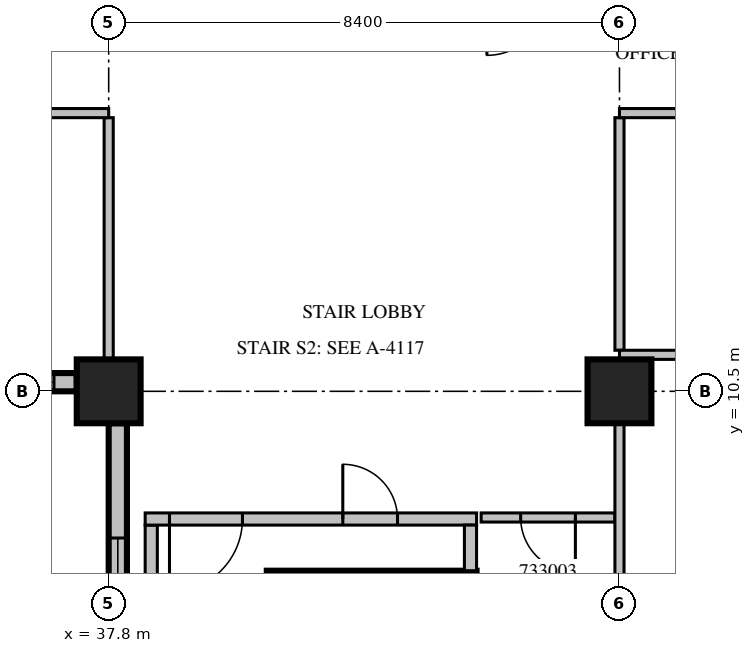
"""IFC4 building model, lengths in metres.
Left out: names, types, materials, properties, quantities, classifications, styles, units other than length and angle.
Written with IfcOpenShell. Run it as: python <this file> out.ifc"""

import sys

from ifc_helpers import new_model, si_unit, direction, frame, frame_2d, origin, origin_2d, place, context, subcontext, project, spatial, rectangle, extrude, source, transform, mapped, element, fill, save


model = new_model("IFC4")
c1 = context("Model", 3, precision=1e-05, world=origin(), true_north=direction((0.0, 1.0)))
c2 = subcontext(c1, "Body", "Model", "MODEL_VIEW")
j1 = project(units=[si_unit("LENGTHUNIT", "METRE"), si_unit("PLANEANGLEUNIT", "RADIAN")], contexts=[c1])
p1 = place(None, origin())
s1 = spatial("IfcSite", under=j1, at=p1, CompositionType="ELEMENT")
p2 = place(p1, origin())
s2 = spatial("IfcBuilding", under=s1, at=p2, CompositionType="ELEMENT")
p3 = place(p2, frame((0.0, 0.0, 149.7)))
s3 = spatial("IfcBuildingStorey", under=s2, at=p3, CompositionType="ELEMENT", Elevation=149.7)
m1 = source(origin(), c2, "Body", "SweptSolid", [
    extrude(rectangle(XDim=1.05, YDim=1.05, at=origin_2d()), origin(), (0.0, 0.0, 1.0), 4.2),
])
for number, where, z_axis, x_axis in (
    (1, (37.8, 10.5, 0.0), (0.0, 0.0, 1.0), (1.0, 0.0, 0.0)),
    (2, (46.2, 10.5, 0.0), (0.0, 0.0, 1.0), (1.0, 0.0, 0.0)),
):
    element("IfcColumn", number, at=place(p3, frame(where, z_axis=z_axis, x_axis=x_axis)), inside=s3, PredefinedType="COLUMN", context=c2, shape_type="MappedRepresentation", body=[
        mapped(m1, transform((0.0, 0.0, 0.0), scale=1.0)),
    ])
m2 = source(origin(), c2, "Body", "SweptSolid", [
    extrude(rectangle(XDim=7.35, YDim=0.3, at=frame_2d((3.675, 0.0))), origin(), (0.0, 0.0, 1.0), 3.8),
])
p4 = place(p3, frame((29.925, 10.65, 0.0), z_axis=(0.0, 0.0, 1.0), x_axis=(1.0, 0.0, 0.0)))
e3 = element("IfcWall", 3, at=p4, inside=s3, PredefinedType="STANDARD", context=c2, shape_type="MappedRepresentation", body=[
    mapped(m2, transform((0.0, 0.0, 0.0), scale=1.0)),
])
m3 = source(origin(), c2, "Body", "SweptSolid", [
    extrude(rectangle(XDim=2.4, YDim=2.7, at=frame_2d((1.2, 1.35))), frame((0.0, 0.16, 0.0), z_axis=(0.0, -1.0, 0.0), x_axis=(1.0, 0.0, 0.0)), (0.0, 0.0, 1.0), 0.32),
])
p5 = place(p4, frame((0.375, 0.0, 0.6)))
e4 = element("IfcOpeningElement", 4, at=p5, cuts=e3, PredefinedType="OPENING", context=c2, shape_type="MappedRepresentation", body=[
    mapped(m3, transform((0.0, 0.0, 0.0), scale=1.0)),
])
p6 = place(p4, frame((4.575, 0.0, 0.6)))
e5 = element("IfcOpeningElement", 5, at=p6, cuts=e3, PredefinedType="OPENING", context=c2, shape_type="MappedRepresentation", body=[
    mapped(m3, transform((0.0, 0.0, 0.0), scale=1.0)),
])
m4 = source(origin(), c2, "Body", "SweptSolid", [
    extrude(rectangle(XDim=8.925, YDim=0.3, at=frame_2d((4.463, 0.0))), origin(), (0.0, 0.0, 1.0), 3.8),
])
p7 = place(p3, frame((37.95, 9.975, 0.0), z_axis=(0.0, 0.0, 1.0), x_axis=(0.0, -1.0, 0.0)))
e6 = element("IfcWall", 6, at=p7, inside=s3, PredefinedType="STANDARD", context=c2, shape_type="MappedRepresentation", body=[
    mapped(m4, transform((0.0, 0.0, 0.0), scale=1.0)),
])
m5 = source(origin(), c2, "Body", "SweptSolid", [
    extrude(rectangle(XDim=1.8, YDim=2.7, at=frame_2d((0.9, 1.35))), frame((0.0, 0.16, 0.0), z_axis=(0.0, -1.0, 0.0), x_axis=(1.0, 0.0, 0.0)), (0.0, 0.0, 1.0), 0.32),
])
p8 = place(p7, frame((1.887, 0.0, 0.6)))
e7 = element("IfcOpeningElement", 7, at=p8, cuts=e6, PredefinedType="OPENING", context=c2, shape_type="MappedRepresentation", body=[
    mapped(m5, transform((0.0, 0.0, 0.0), scale=1.0)),
])
p9 = place(p7, frame((6.15, 0.0, 0.6)))
e8 = element("IfcOpeningElement", 8, at=p9, cuts=e6, PredefinedType="OPENING", context=c2, shape_type="MappedRepresentation", body=[
    mapped(m3, transform((0.0, 0.0, 0.0), scale=1.0)),
])
m6 = source(origin(), c2, "Body", "SweptSolid", [
    extrude(rectangle(XDim=3.45, YDim=0.25, at=frame_2d((1.725, 0.0))), origin(), (0.0, 0.0, 1.0), 3.8),
])
p10 = place(p3, frame((40.4, 7.425, 0.0), z_axis=(0.0, 0.0, 1.0), x_axis=(1.0, 0.0, 0.0)))
e9 = element("IfcWall", 9, at=p10, inside=s3, PredefinedType="SOLIDWALL", context=c2, shape_type="MappedRepresentation", body=[
    mapped(m6, transform((0.0, 0.0, 0.0), scale=1.0)),
])
m7 = source(origin(), c2, "Body", "SweptSolid", [
    extrude(rectangle(XDim=8.0, YDim=0.2, at=frame_2d((4.0, 0.0))), origin(), (0.0, 0.0, 1.0), 3.8),
])
p11 = place(p3, frame((38.5, 0.3, 0.0), z_axis=(0.0, 0.0, 1.0), x_axis=(0.0, 1.0, 0.0)))
e10 = element("IfcWall", 10, at=p11, inside=s3, PredefinedType="PARTITIONING", context=c2, shape_type="MappedRepresentation", body=[
    mapped(m7, transform((0.0, 0.0, 0.0), scale=1.0)),
])
m8 = source(origin(), c2, "Body", "SweptSolid", [
    extrude(rectangle(XDim=5.45, YDim=0.2, at=frame_2d((2.725, 0.0))), origin(), (0.0, 0.0, 1.0), 3.8),
])
p12 = place(p3, frame((38.4, 8.4, 0.0), z_axis=(0.0, 0.0, 1.0), x_axis=(1.0, 0.0, 0.0)))
e11 = element("IfcWall", 11, at=p12, inside=s3, PredefinedType="PARTITIONING", context=c2, shape_type="MappedRepresentation", body=[
    mapped(m8, transform((0.0, 0.0, 0.0), scale=1.0)),
])
m9 = source(origin(), c2, "Body", "SweptSolid", [
    extrude(rectangle(XDim=1.2, YDim=2.1, at=frame_2d((0.6, 1.05))), frame((0.0, 0.11, 0.0), z_axis=(0.0, -1.0, 0.0), x_axis=(1.0, 0.0, 0.0)), (0.0, 0.0, 1.0), 0.22),
])
p13 = place(p12, frame((0.4, 0.0, 0.0)))
e12 = element("IfcOpeningElement", 12, at=p13, cuts=e11, PredefinedType="OPENING", context=c2, shape_type="MappedRepresentation", body=[
    mapped(m9, transform((0.0, 0.0, 0.0), scale=1.0)),
])
m10 = source(origin(), c2, "Body", "SweptSolid", [
    extrude(rectangle(XDim=0.9, YDim=2.1, at=frame_2d((0.45, 1.05))), frame((0.0, 0.11, 0.0), z_axis=(0.0, -1.0, 0.0), x_axis=(1.0, 0.0, 0.0)), (0.0, 0.0, 1.0), 0.22),
])
p14 = place(p12, frame((3.25, 0.0, 0.0)))
e13 = element("IfcOpeningElement", 13, at=p14, cuts=e11, PredefinedType="OPENING", context=c2, shape_type="MappedRepresentation", body=[
    mapped(m10, transform((0.0, 0.0, 0.0), scale=1.0)),
])
m11 = source(origin(), c2, "Body", "SweptSolid", [
    extrude(rectangle(XDim=0.75, YDim=0.2, at=frame_2d((0.375, 0.0))), origin(), (0.0, 0.0, 1.0), 3.8),
])
p15 = place(p3, frame((43.75, 7.55, 0.0), z_axis=(0.0, 0.0, 1.0), x_axis=(0.0, 1.0, 0.0)))
e14 = element("IfcWall", 14, at=p15, inside=s3, PredefinedType="PARTITIONING", context=c2, shape_type="MappedRepresentation", body=[
    mapped(m11, transform((0.0, 0.0, 0.0), scale=1.0)),
])
m12 = source(origin(), c2, "Body", "SweptSolid", [
    extrude(rectangle(XDim=2.2, YDim=0.15, at=frame_2d((1.1, 0.0))), origin(), (0.0, 0.0, 1.0), 3.8),
])
p16 = place(p3, frame((46.125, 8.425, 0.0), z_axis=(0.0, 0.0, 1.0), x_axis=(-1.0, 0.0, 0.0)))
e15 = element("IfcWall", 15, at=p16, inside=s3, PredefinedType="PARTITIONING", context=c2, shape_type="MappedRepresentation", body=[
    mapped(m12, transform((0.0, 0.0, 0.0), scale=1.0)),
])
m13 = source(origin(), c2, "Body", "SweptSolid", [
    extrude(rectangle(XDim=0.9, YDim=2.1, at=frame_2d((0.45, 1.05))), frame((0.0, 0.085, 0.0), z_axis=(0.0, -1.0, 0.0), x_axis=(1.0, 0.0, 0.0)), (0.0, 0.0, 1.0), 0.17),
])
p17 = place(p16, frame((0.65, 0.0, 0.0)))
e16 = element("IfcOpeningElement", 16, at=p17, cuts=e15, PredefinedType="OPENING", context=c2, shape_type="MappedRepresentation", body=[
    mapped(m13, transform((0.0, 0.0, 0.0), scale=1.0)),
])
m14 = source(origin(), c2, "Body", "SweptSolid", [
    extrude(rectangle(XDim=3.976, YDim=0.15, at=frame_2d((1.988, 0.0))), origin(), (0.0, 0.0, 1.0), 3.8),
])
p18 = place(p3, frame((37.8, 11.024, 0.0), z_axis=(0.0, 0.0, 1.0), x_axis=(0.0, 1.0, 0.0)))
e17 = element("IfcWall", 17, at=p18, inside=s3, PredefinedType="PARTITIONING", context=c2, shape_type="MappedRepresentation", body=[
    mapped(m14, transform((0.0, 0.0, 0.0), scale=1.0)),
])
m15 = source(origin(), c2, "Body", "SweptSolid", [
    extrude(rectangle(XDim=8.927, YDim=0.15, at=frame_2d((4.463, 0.0))), origin(), (0.0, 0.0, 1.0), 3.8),
])
p19 = place(p3, frame((46.2, 1.049, 0.0), z_axis=(0.0, 0.0, 1.0), x_axis=(0.0, 1.0, 0.0)))
e18 = element("IfcWall", 18, at=p19, inside=s3, PredefinedType="PARTITIONING", context=c2, shape_type="MappedRepresentation", body=[
    mapped(m15, transform((0.0, 0.0, 0.0), scale=1.0)),
])
m16 = source(origin(), c2, "Body", "SweptSolid", [
    extrude(rectangle(XDim=3.825, YDim=0.15, at=frame_2d((1.913, 0.0))), origin(), (0.0, 0.0, 1.0), 3.8),
])
p20 = place(p3, frame((46.2, 11.175, 0.0), z_axis=(0.0, 0.0, 1.0), x_axis=(0.0, 1.0, 0.0)))
e19 = element("IfcWall", 19, at=p20, inside=s3, PredefinedType="PARTITIONING", context=c2, shape_type="MappedRepresentation", body=[
    mapped(m16, transform((0.0, 0.0, 0.0), scale=1.0)),
])
m17 = source(origin(), c2, "Body", "SweptSolid", [
    extrude(rectangle(XDim=24.9, YDim=0.15, at=frame_2d((12.45, 0.0))), origin(), (0.0, 0.0, 1.0), 3.8),
])
p21 = place(p3, frame((71.1, 11.1, 0.0), z_axis=(0.0, 0.0, 1.0), x_axis=(-1.0, 0.0, 0.0)))
e20 = element("IfcWall", 20, at=p21, inside=s3, PredefinedType="PARTITIONING", context=c2, shape_type="MappedRepresentation", body=[
    mapped(m17, transform((0.0, 0.0, 0.0), scale=1.0)),
])
m18 = source(origin(), c2, "Body", "SweptSolid", [
    extrude(rectangle(XDim=1.1, YDim=2.1, at=frame_2d((0.55, 1.05))), frame((0.0, 0.085, 0.0), z_axis=(0.0, -1.0, 0.0), x_axis=(1.0, 0.0, 0.0)), (0.0, 0.0, 1.0), 0.17),
])
p22 = place(p21, frame((19.988, 0.0, 0.0)))
e21 = element("IfcOpeningElement", 21, at=p22, cuts=e20, PredefinedType="OPENING", context=c2, shape_type="MappedRepresentation", body=[
    mapped(m18, transform((0.0, 0.0, 0.0), scale=1.0)),
])
p23 = place(p21, frame((15.63, 0.0, 0.0)))
e22 = element("IfcOpeningElement", 22, at=p23, cuts=e20, PredefinedType="OPENING", context=c2, shape_type="MappedRepresentation", body=[
    mapped(m13, transform((0.0, 0.0, 0.0), scale=1.0)),
])
p24 = place(p21, frame((9.75, 0.0, 0.0)))
e23 = element("IfcOpeningElement", 23, at=p24, cuts=e20, PredefinedType="OPENING", context=c2, shape_type="MappedRepresentation", body=[
    mapped(m13, transform((0.0, 0.0, 0.0), scale=1.0)),
])
p25 = place(p21, frame((2.205, 0.0, 0.0)))
e24 = element("IfcOpeningElement", 24, at=p25, cuts=e20, PredefinedType="OPENING", context=c2, shape_type="MappedRepresentation", body=[
    mapped(m13, transform((0.0, 0.0, 0.0), scale=1.0)),
])
m19 = source(origin(), c2, "Body", "SweptSolid", [
    extrude(rectangle(XDim=8.4, YDim=0.15, at=frame_2d((4.2, 0.0))), origin(), (0.0, 0.0, 1.0), 3.8),
])
p26 = place(p3, frame((37.8, 15.075, 0.0), z_axis=(0.0, 0.0, 1.0), x_axis=(-1.0, 0.0, 0.0)))
e25 = element("IfcWall", 25, at=p26, inside=s3, PredefinedType="PARTITIONING", context=c2, shape_type="MappedRepresentation", body=[
    mapped(m19, transform((0.0, 0.0, 0.0), scale=1.0)),
])
m20 = source(origin(), c2, "Body", "SweptSolid", [
    extrude(rectangle(XDim=1.2, YDim=2.1, at=frame_2d((0.6, 1.05))), frame((0.0, 0.085, 0.0), z_axis=(0.0, -1.0, 0.0), x_axis=(1.0, 0.0, 0.0)), (0.0, 0.0, 1.0), 0.17),
])
p27 = place(p26, frame((3.6, 0.0, 0.0)))
e26 = element("IfcOpeningElement", 26, at=p27, cuts=e25, PredefinedType="OPENING", context=c2, shape_type="MappedRepresentation", body=[
    mapped(m20, transform((0.0, 0.0, 0.0), scale=1.0)),
])
p28 = place(p3, frame((71.1, 15.075, 0.0), z_axis=(0.0, 0.0, 1.0), x_axis=(-1.0, 0.0, 0.0)))
e27 = element("IfcWall", 27, at=p28, inside=s3, PredefinedType="PARTITIONING", context=c2, shape_type="MappedRepresentation", body=[
    mapped(m17, transform((0.0, 0.0, 0.0), scale=1.0)),
])
p29 = place(p28, frame((19.754, 0.0, 0.0)))
e28 = element("IfcOpeningElement", 28, at=p29, cuts=e27, PredefinedType="OPENING", context=c2, shape_type="MappedRepresentation", body=[
    mapped(m18, transform((0.0, 0.0, 0.0), scale=1.0)),
])
p30 = place(p28, frame((22.794, 0.0, 0.0)))
e29 = element("IfcOpeningElement", 29, at=p30, cuts=e27, PredefinedType="OPENING", context=c2, shape_type="MappedRepresentation", body=[
    mapped(m13, transform((0.0, 0.0, 0.0), scale=1.0)),
])
p31 = place(p28, frame((10.65, 0.0, 0.0)))
e30 = element("IfcOpeningElement", 30, at=p31, cuts=e27, PredefinedType="OPENING", context=c2, shape_type="MappedRepresentation", body=[
    mapped(m20, transform((0.0, 0.0, 0.0), scale=1.0)),
])
p32 = place(p28, frame((1.103, 0.0, 0.0)))
e31 = element("IfcOpeningElement", 31, at=p32, cuts=e27, PredefinedType="OPENING", context=c2, shape_type="MappedRepresentation", body=[
    mapped(m20, transform((0.0, 0.0, 0.0), scale=1.0)),
])
m21 = source(origin(), c2, "Body", "SweptSolid", [
    extrude(rectangle(XDim=2.4, YDim=2.7, at=frame_2d((1.2, 1.35))), frame((0.0, 0.03, 0.0), z_axis=(0.0, -1.0, 0.0), x_axis=(1.0, 0.0, 0.0)), (0.0, 0.0, 1.0), 0.06),
])
p33 = place(p6, origin())
e32 = element("IfcWindow", 32, at=p33, inside=s3, PartitioningType="SINGLE_PANEL", PredefinedType="WINDOW", context=c2, shape_type="MappedRepresentation", body=[
    mapped(m21, transform((0.0, 0.0, 0.0), scale=1.0)),
])
fill(e5, e32)
m22 = source(origin(), c2, "Body", "SweptSolid", [
    extrude(rectangle(XDim=1.8, YDim=2.7, at=frame_2d((0.9, 1.35))), frame((0.0, 0.03, 0.0), z_axis=(0.0, -1.0, 0.0), x_axis=(1.0, 0.0, 0.0)), (0.0, 0.0, 1.0), 0.06),
])
p34 = place(p8, origin())
e33 = element("IfcWindow", 33, at=p34, inside=s3, PartitioningType="SINGLE_PANEL", PredefinedType="WINDOW", context=c2, shape_type="MappedRepresentation", body=[
    mapped(m22, transform((0.0, 0.0, 0.0), scale=1.0)),
])
fill(e7, e33)
m23 = source(origin(), c2, "Body", "SweptSolid", [
    extrude(rectangle(XDim=1.2, YDim=2.1, at=frame_2d((0.6, 1.05))), frame((0.0, 0.025, 0.0), z_axis=(0.0, -1.0, 0.0), x_axis=(1.0, 0.0, 0.0)), (0.0, 0.0, 1.0), 0.05),
])
p35 = place(p13, origin())
e34 = element("IfcDoor", 34, at=p35, inside=s3, OperationType="SINGLE_SWING_RIGHT", PredefinedType="DOOR", context=c2, shape_type="MappedRepresentation", body=[
    mapped(m23, transform((0.0, 0.0, 0.0), scale=1.0)),
])
fill(e12, e34)
m24 = source(origin(), c2, "Body", "SweptSolid", [
    extrude(rectangle(XDim=0.9, YDim=2.1, at=frame_2d((0.45, 1.05))), frame((0.0, 0.025, 0.0), z_axis=(0.0, -1.0, 0.0), x_axis=(1.0, 0.0, 0.0)), (0.0, 0.0, 1.0), 0.05),
])
p36 = place(p14, origin())
e35 = element("IfcDoor", 35, at=p36, inside=s3, OperationType="SINGLE_SWING_LEFT", PredefinedType="DOOR", context=c2, shape_type="MappedRepresentation", body=[
    mapped(m24, transform((0.0, 0.0, 0.0), scale=1.0)),
])
fill(e13, e35)
p37 = place(p17, origin())
e36 = element("IfcDoor", 36, at=p37, inside=s3, OperationType="SINGLE_SWING_LEFT", PredefinedType="DOOR", context=c2, shape_type="MappedRepresentation", body=[
    mapped(m24, transform((0.0, 0.0, 0.0), scale=1.0)),
])
fill(e16, e36)
save(model, sys.argv[1])
